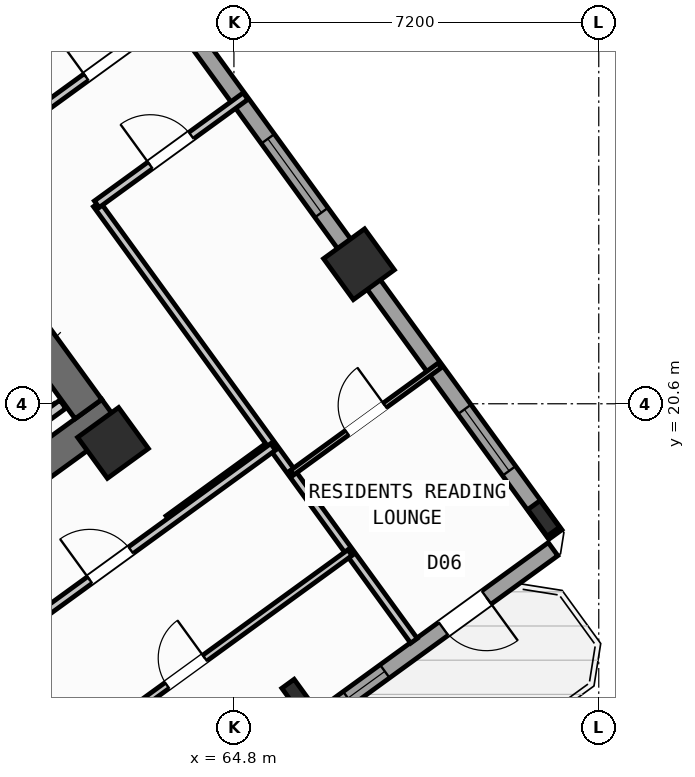
"""IFC4 building model, lengths in metres.
Left out: names, types, materials, properties, quantities, classifications, styles, units other than length and angle.
Written with IfcOpenShell. Run it as: python <this file> out.ifc"""

import sys

from ifc_helpers import new_model, si_unit, direction, frame, frame_2d, origin, origin_2d, place, context, subcontext, project, spatial, rectangle, hollow_rectangle, i_section, extrude, source, transform, mapped, element, fill, save


model = new_model("IFC4")
c1 = context("Model", 3, precision=1e-05, world=origin(), true_north=direction((0.0, 1.0)))
c2 = subcontext(c1, "Body", "Model", "MODEL_VIEW")
j1 = project(units=[si_unit("LENGTHUNIT", "METRE"), si_unit("PLANEANGLEUNIT", "RADIAN")], contexts=[c1])
p1 = place(None, origin())
s1 = spatial("IfcSite", under=j1, at=p1, CompositionType="ELEMENT")
p2 = place(p1, origin())
s2 = spatial("IfcBuilding", under=s1, at=p2, CompositionType="ELEMENT")
p3 = place(p2, frame((0.0, 0.0, 63.6)))
s3 = spatial("IfcBuildingStorey", under=s2, at=p3, CompositionType="ELEMENT", Elevation=63.6)
p4 = place(p3, frame((52.318, 13.11, 0.0), z_axis=(0.0, 0.0, 1.0), x_axis=(0.809019445368, 0.587781878776, 0.0)))
e1 = element("IfcWall", 1, at=p4, inside=s3, PredefinedType="SHEAR", context=c2, shape_type="SweptSolid", body=[
    extrude(rectangle(XDim=12.44, YDim=0.65, at=frame_2d((6.22, 0.0))), origin(), (0.0, 0.0, 1.0), 3.35),
])
p5 = place(p3, frame((61.929, 20.494, 0.0), z_axis=(0.0, 0.0, 1.0), x_axis=(-0.58782982593, 0.808984607855, 0.0)))
e2 = element("IfcWall", 2, at=p5, inside=s3, PredefinedType="SHEAR", context=c2, shape_type="SweptSolid", body=[
    extrude(rectangle(XDim=3.525, YDim=0.65, at=frame_2d((1.762, 0.0))), origin(), (0.0, 0.0, 1.0), 3.35),
])
m1 = source(origin(), c2, "Body", "SweptSolid", [
    extrude(i_section(OverallWidth=0.3, OverallDepth=0.65, WebThickness=0.016, FlangeThickness=0.031, at=origin_2d()), origin(), (0.0, 0.0, 1.0), 3.6),
])
p6 = place(p3, frame((66.058, 14.811, 0.0), z_axis=(0.0, 0.0, 1.0), x_axis=(0.809016994375, 0.587785252292, 0.0)))
e3 = element("IfcColumn", 3, at=p6, inside=s3, PredefinedType="COLUMN", context=c2, shape_type="MappedRepresentation", body=[
    mapped(m1, transform((0.0, 0.0, 0.0), scale=1.0)),
])
m2 = source(origin(), c2, "Body", "SweptSolid", [
    extrude(hollow_rectangle(XDim=1.0, YDim=1.0, WallThickness=0.04, at=origin_2d()), origin(), (0.0, 0.0, 1.0), 3.6),
])
p7 = place(p3, frame((62.414, 19.827, 0.0), z_axis=(0.0, 0.0, 1.0), x_axis=(0.809016994375, 0.587785252292, 0.0)))
e4 = element("IfcColumn", 4, at=p7, inside=s3, PredefinedType="COLUMN", context=c2, shape_type="MappedRepresentation", body=[
    mapped(m2, transform((0.0, 0.0, 0.0), scale=1.0)),
])
p8 = place(p3, frame((70.912, 18.338, 0.0), z_axis=(0.0, 0.0, 1.0), x_axis=(0.809016994375, 0.587785252292, 0.0)))
e5 = element("IfcColumn", 5, at=p8, inside=s3, PredefinedType="COLUMN", context=c2, shape_type="MappedRepresentation", body=[
    mapped(m1, transform((0.0, 0.0, 0.0), scale=1.0)),
])
p9 = place(p3, frame((67.268, 23.354, 0.0), z_axis=(0.0, 0.0, 1.0), x_axis=(0.809016994375, 0.587785252292, 0.0)))
e6 = element("IfcColumn", 6, at=p9, inside=s3, PredefinedType="COLUMN", context=c2, shape_type="MappedRepresentation", body=[
    mapped(m2, transform((0.0, 0.0, 0.0), scale=1.0)),
])
p10 = place(p3, frame((58.455, 35.484, 0.0), z_axis=(0.0, 0.0, 1.0), x_axis=(0.587783625747, -0.809018176127, 0.0)))
e7 = element("IfcWall", 7, at=p10, inside=s3, PredefinedType="STANDARD", context=c2, shape_type="SweptSolid", body=[
    extrude(rectangle(XDim=21.587, YDim=0.32, at=frame_2d((10.794, 0.0))), origin(), (0.0, 0.0, 1.0), 2.725),
])
p11 = place(p10, frame((2.994, 0.0, 0.8)))
e8 = element("IfcOpeningElement", 8, at=p11, cuts=e7, PredefinedType="OPENING", context=c2, shape_type="SweptSolid", body=[
    extrude(rectangle(XDim=2.1, YDim=1.55, at=frame_2d((1.05, 0.775))), frame((0.0, 0.17, 0.0), z_axis=(0.0, -1.0, 0.0), x_axis=(1.0, 0.0, 0.0)), (0.0, 0.0, 1.0), 0.34),
])
p12 = place(p10, frame((11.934, 0.0, 0.85)))
e9 = element("IfcOpeningElement", 9, at=p12, cuts=e7, PredefinedType="OPENING", context=c2, shape_type="SweptSolid", body=[
    extrude(rectangle(XDim=1.8, YDim=1.5, at=frame_2d((0.9, 0.75))), frame((0.0, 0.17, 0.0), z_axis=(0.0, -1.0, 0.0), x_axis=(1.0, 0.0, 0.0)), (0.0, 0.0, 1.0), 0.34),
])
p13 = place(p10, frame((18.535, 0.0, 0.85)))
e10 = element("IfcOpeningElement", 10, at=p13, cuts=e7, PredefinedType="OPENING", context=c2, shape_type="SweptSolid", body=[
    extrude(rectangle(XDim=1.5, YDim=1.5, at=frame_2d((0.75, 0.75))), frame((0.0, 0.17, 0.0), z_axis=(0.0, -1.0, 0.0), x_axis=(1.0, 0.0, 0.0)), (0.0, 0.0, 1.0), 0.34),
])
p14 = place(p3, frame((71.098, 17.731, 0.0), z_axis=(0.0, 0.0, 1.0), x_axis=(-0.809021120468, -0.587779573171, 0.0)))
e11 = element("IfcWall", 11, at=p14, inside=s3, PredefinedType="STANDARD", context=c2, shape_type="SweptSolid", body=[
    extrude(rectangle(XDim=17.588, YDim=0.32, at=frame_2d((8.794, 0.0))), origin(), (0.0, 0.0, 1.0), 3.35),
])
p15 = place(p14, frame((1.624, 0.0, 0.0)))
e12 = element("IfcOpeningElement", 12, at=p15, cuts=e11, PredefinedType="OPENING", context=c2, shape_type="SweptSolid", body=[
    extrude(rectangle(XDim=1.05, YDim=2.15, at=frame_2d((0.525, 1.075))), frame((0.0, 0.17, 0.0), z_axis=(0.0, -1.0, 0.0), x_axis=(1.0, 0.0, 0.0)), (0.0, 0.0, 1.0), 0.34),
])
p16 = place(p14, frame((4.104, 0.0, 1.0)))
e13 = element("IfcOpeningElement", 13, at=p16, cuts=e11, PredefinedType="OPENING", context=c2, shape_type="SweptSolid", body=[
    extrude(rectangle(XDim=0.9, YDim=1.25, at=frame_2d((0.45, 0.625))), frame((0.0, 0.17, 0.0), z_axis=(0.0, -1.0, 0.0), x_axis=(1.0, 0.0, 0.0)), (0.0, 0.0, 1.0), 0.34),
])
p17 = place(p14, frame((7.879, 0.0, 0.85)))
e14 = element("IfcOpeningElement", 14, at=p17, cuts=e11, PredefinedType="OPENING", context=c2, shape_type="SweptSolid", body=[
    extrude(rectangle(XDim=1.8, YDim=1.5, at=frame_2d((0.9, 0.75))), frame((0.0, 0.17, 0.0), z_axis=(0.0, -1.0, 0.0), x_axis=(1.0, 0.0, 0.0)), (0.0, 0.0, 1.0), 0.34),
])
p18 = place(p14, frame((12.849, 0.0, 0.85)))
e15 = element("IfcOpeningElement", 15, at=p18, cuts=e11, PredefinedType="OPENING", context=c2, shape_type="SweptSolid", body=[
    extrude(rectangle(XDim=1.8, YDim=1.5, at=frame_2d((0.9, 0.75))), frame((0.0, 0.17, 0.0), z_axis=(0.0, -1.0, 0.0), x_axis=(1.0, 0.0, 0.0)), (0.0, 0.0, 1.0), 0.34),
])
p19 = place(p3, frame((58.472, 18.447, 0.0), z_axis=(0.0, 0.0, 1.0), x_axis=(0.809022487728, 0.587777691266, 0.0)))
e16 = element("IfcWall", 16, at=p19, inside=s3, PredefinedType="STANDARD", context=c2, shape_type="SweptSolid", body=[
    extrude(rectangle(XDim=3.648, YDim=0.2, at=frame_2d((1.824, 0.0))), origin(), (0.0, 0.0, 1.0), 3.34),
])
p20 = place(p3, frame((63.507, 18.322, 0.0), z_axis=(0.0, 0.0, 1.0), x_axis=(0.809034604122, 0.587761013791, 0.0)))
e17 = element("IfcWall", 17, at=p20, inside=s3, PredefinedType="PARTITIONING", context=c2, shape_type="SweptSolid", body=[
    extrude(rectangle(XDim=2.51, YDim=0.16, at=frame_2d((1.255, 0.0))), origin(), (0.0, 0.0, 1.0), 3.34),
])
p21 = place(p3, frame((68.353, 15.922, 0.0), z_axis=(0.0, 0.0, 1.0), x_axis=(-0.587783168305, 0.809018508476, 0.0)))
e18 = element("IfcWall", 18, at=p21, inside=s3, PredefinedType="PARTITIONING", context=c2, shape_type="SweptSolid", body=[
    extrude(rectangle(XDim=10.65, YDim=0.16, at=frame_2d((5.325, 0.0))), origin(), (0.0, 0.0, 1.0), 3.34),
])
p22 = place(p3, frame((62.093, 24.538, 0.0), z_axis=(0.0, 0.0, 1.0), x_axis=(0.809035546126, 0.58775971715, 0.0)))
e19 = element("IfcWall", 19, at=p22, inside=s3, PredefinedType="PARTITIONING", context=c2, shape_type="SweptSolid", body=[
    extrude(rectangle(XDim=3.63, YDim=0.16, at=frame_2d((1.815, 0.0))), origin(), (0.0, 0.0, 1.0), 3.34),
])
p23 = place(p22, frame((1.305, 0.0, 0.0)))
e20 = element("IfcOpeningElement", 20, at=p23, cuts=e19, PredefinedType="OPENING", context=c2, shape_type="SweptSolid", body=[
    extrude(rectangle(XDim=1.0, YDim=2.1, at=frame_2d((0.5, 1.05))), frame((0.0, 0.09, 0.0), z_axis=(0.0, -1.0, 0.0), x_axis=(1.0, 0.0, 0.0)), (0.0, 0.0, 1.0), 0.18),
])
p24 = place(p3, frame((60.829, 26.278, 0.0), z_axis=(0.0, 0.0, 1.0), x_axis=(0.809003564202, 0.587803736896, 0.0)))
e21 = element("IfcWall", 21, at=p24, inside=s3, PredefinedType="PARTITIONING", context=c2, shape_type="SweptSolid", body=[
    extrude(rectangle(XDim=3.63, YDim=0.16, at=frame_2d((1.815, 0.0))), origin(), (0.0, 0.0, 1.0), 3.34),
])
p25 = place(p24, frame((1.305, 0.0, 0.0)))
e22 = element("IfcOpeningElement", 22, at=p25, cuts=e21, PredefinedType="OPENING", context=c2, shape_type="SweptSolid", body=[
    extrude(rectangle(XDim=1.0, YDim=2.1, at=frame_2d((0.5, 1.05))), frame((0.0, 0.09, 0.0), z_axis=(0.0, -1.0, 0.0), x_axis=(1.0, 0.0, 0.0)), (0.0, 0.0, 1.0), 0.18),
])
p26 = place(p3, frame((65.944, 19.238, 0.0), z_axis=(0.0, 0.0, 1.0), x_axis=(0.809013833588, 0.587789602718, 0.0)))
e23 = element("IfcWall", 23, at=p26, inside=s3, PredefinedType="PARTITIONING", context=c2, shape_type="SweptSolid", body=[
    extrude(rectangle(XDim=3.61, YDim=0.11, at=frame_2d((1.805, 0.0))), origin(), (0.0, 0.0, 1.0), 3.34),
])
p27 = place(p26, frame((1.345, 0.0, 0.0)))
e24 = element("IfcOpeningElement", 24, at=p27, cuts=e23, PredefinedType="OPENING", context=c2, shape_type="SweptSolid", body=[
    extrude(rectangle(XDim=0.92, YDim=2.08, at=frame_2d((0.46, 1.04))), frame((0.0, 0.065, 0.0), z_axis=(0.0, -1.0, 0.0), x_axis=(1.0, 0.0, 0.0)), (0.0, 0.0, 1.0), 0.13),
])
p28 = place(p3, frame((53.705, 11.126, 0.0), z_axis=(0.0, 0.0, 1.0), x_axis=(0.809014504436, 0.587788679384, 0.0)))
e25 = element("IfcWall", 25, at=p28, inside=s3, PredefinedType="PARTITIONING", context=c2, shape_type="SweptSolid", body=[
    extrude(rectangle(XDim=14.67, YDim=0.16, at=frame_2d((7.335, 0.0))), origin(), (0.0, 0.0, 1.0), 3.34),
])
p29 = place(p28, frame((10.2, 0.0, 0.0)))
e26 = element("IfcOpeningElement", 26, at=p29, cuts=e25, PredefinedType="OPENING", context=c2, shape_type="SweptSolid", body=[
    extrude(rectangle(XDim=1.0, YDim=2.1, at=frame_2d((0.5, 1.05))), frame((0.0, 0.09, 0.0), z_axis=(0.0, -1.0, 0.0), x_axis=(1.0, 0.0, 0.0)), (0.0, 0.0, 1.0), 0.18),
])
p30 = place(p3, frame((56.249, 9.785, 0.0), z_axis=(0.0, 0.0, 1.0), x_axis=(0.809011747655, 0.587792473715, 0.0)))
e27 = element("IfcWall", 27, at=p30, inside=s3, PredefinedType="PLUMBINGWALL", context=c2, shape_type="SweptSolid", body=[
    extrude(rectangle(XDim=13.4, YDim=0.14, at=frame_2d((6.7, 0.0))), origin(), (0.0, 0.0, 1.0), 3.34),
])
p31 = place(p30, frame((8.94, 0.0, 0.0)))
e28 = element("IfcOpeningElement", 28, at=p31, cuts=e27, PredefinedType="OPENING", context=c2, shape_type="SweptSolid", body=[
    extrude(rectangle(XDim=0.92, YDim=2.08, at=frame_2d((0.46, 1.04))), frame((0.0, 0.08, 0.0), z_axis=(0.0, -1.0, 0.0), x_axis=(1.0, 0.0, 0.0)), (0.0, 0.0, 1.0), 0.16),
])
m3 = source(origin(), c2, "Body", "SweptSolid", [
    extrude(rectangle(XDim=1.05, YDim=2.15, at=frame_2d((0.525, 1.075))), frame((0.0, 0.025, 0.0), z_axis=(0.0, -1.0, 0.0), x_axis=(1.0, 0.0, 0.0)), (0.0, 0.0, 1.0), 0.05),
])
p32 = place(p15, origin())
e29 = element("IfcDoor", 29, at=p32, inside=s3, OperationType="SINGLE_SWING_LEFT", PredefinedType="DOOR", context=c2, shape_type="MappedRepresentation", body=[
    mapped(m3, transform((0.0, 0.0, 0.0), scale=1.0)),
])
fill(e12, e29)
m4 = source(origin(), c2, "Body", "SweptSolid", [
    extrude(rectangle(XDim=1.8, YDim=1.5, at=frame_2d((0.9, 0.75))), frame((0.0, 0.03, 0.0), z_axis=(0.0, -1.0, 0.0), x_axis=(1.0, 0.0, 0.0)), (0.0, 0.0, 1.0), 0.06),
])
p33 = place(p12, origin())
e30 = element("IfcWindow", 30, at=p33, inside=s3, PartitioningType="SINGLE_PANEL", PredefinedType="WINDOW", context=c2, shape_type="MappedRepresentation", body=[
    mapped(m4, transform((0.0, 0.0, 0.0), scale=1.0)),
])
fill(e9, e30)
m5 = source(origin(), c2, "Body", "SweptSolid", [
    extrude(rectangle(XDim=1.5, YDim=1.5, at=frame_2d((0.75, 0.75))), frame((0.0, 0.03, 0.0), z_axis=(0.0, -1.0, 0.0), x_axis=(1.0, 0.0, 0.0)), (0.0, 0.0, 1.0), 0.06),
])
p34 = place(p13, origin())
e31 = element("IfcWindow", 31, at=p34, inside=s3, PartitioningType="SINGLE_PANEL", PredefinedType="WINDOW", context=c2, shape_type="MappedRepresentation", body=[
    mapped(m5, transform((0.0, 0.0, 0.0), scale=1.0)),
])
fill(e10, e31)
m6 = source(origin(), c2, "Body", "SweptSolid", [
    extrude(rectangle(XDim=0.9, YDim=1.25, at=frame_2d((0.45, 0.625))), frame((0.0, 0.03, 0.0), z_axis=(0.0, -1.0, 0.0), x_axis=(1.0, 0.0, 0.0)), (0.0, 0.0, 1.0), 0.06),
])
p35 = place(p16, origin())
e32 = element("IfcWindow", 32, at=p35, inside=s3, PartitioningType="SINGLE_PANEL", PredefinedType="WINDOW", context=c2, shape_type="MappedRepresentation", body=[
    mapped(m6, transform((0.0, 0.0, 0.0), scale=1.0)),
])
fill(e13, e32)
m7 = source(origin(), c2, "Body", "SweptSolid", [
    extrude(rectangle(XDim=1.0, YDim=2.1, at=frame_2d((0.5, 1.05))), frame((0.0, 0.025, 0.0), z_axis=(0.0, -1.0, 0.0), x_axis=(1.0, 0.0, 0.0)), (0.0, 0.0, 1.0), 0.05),
])
p36 = place(p25, origin())
e33 = element("IfcDoor", 33, at=p36, inside=s3, OperationType="SINGLE_SWING_LEFT", PredefinedType="DOOR", context=c2, shape_type="MappedRepresentation", body=[
    mapped(m7, transform((0.0, 0.0, 0.0), scale=1.0)),
])
fill(e22, e33)
p37 = place(p23, origin())
e34 = element("IfcDoor", 34, at=p37, inside=s3, OperationType="SINGLE_SWING_LEFT", PredefinedType="DOOR", context=c2, shape_type="MappedRepresentation", body=[
    mapped(m7, transform((0.0, 0.0, 0.0), scale=1.0)),
])
fill(e20, e34)
m8 = source(origin(), c2, "Body", "SweptSolid", [
    extrude(rectangle(XDim=0.92, YDim=2.08, at=frame_2d((0.46, 1.04))), frame((0.0, 0.025, 0.0), z_axis=(0.0, -1.0, 0.0), x_axis=(1.0, 0.0, 0.0)), (0.0, 0.0, 1.0), 0.05),
])
p38 = place(p27, origin())
e35 = element("IfcDoor", 35, at=p38, inside=s3, OperationType="SINGLE_SWING_RIGHT", PredefinedType="DOOR", context=c2, shape_type="MappedRepresentation", body=[
    mapped(m8, transform((0.0, 0.0, 0.0), scale=1.0)),
])
fill(e24, e35)
p39 = place(p29, origin())
e36 = element("IfcDoor", 36, at=p39, inside=s3, OperationType="SINGLE_SWING_LEFT", PredefinedType="DOOR", context=c2, shape_type="MappedRepresentation", body=[
    mapped(m7, transform((0.0, 0.0, 0.0), scale=1.0)),
])
fill(e26, e36)
p40 = place(p31, origin())
e37 = element("IfcDoor", 37, at=p40, inside=s3, OperationType="SINGLE_SWING_RIGHT", PredefinedType="DOOR", context=c2, shape_type="MappedRepresentation", body=[
    mapped(m8, transform((0.0, 0.0, 0.0), scale=1.0)),
])
fill(e28, e37)
save(model, sys.argv[1])
